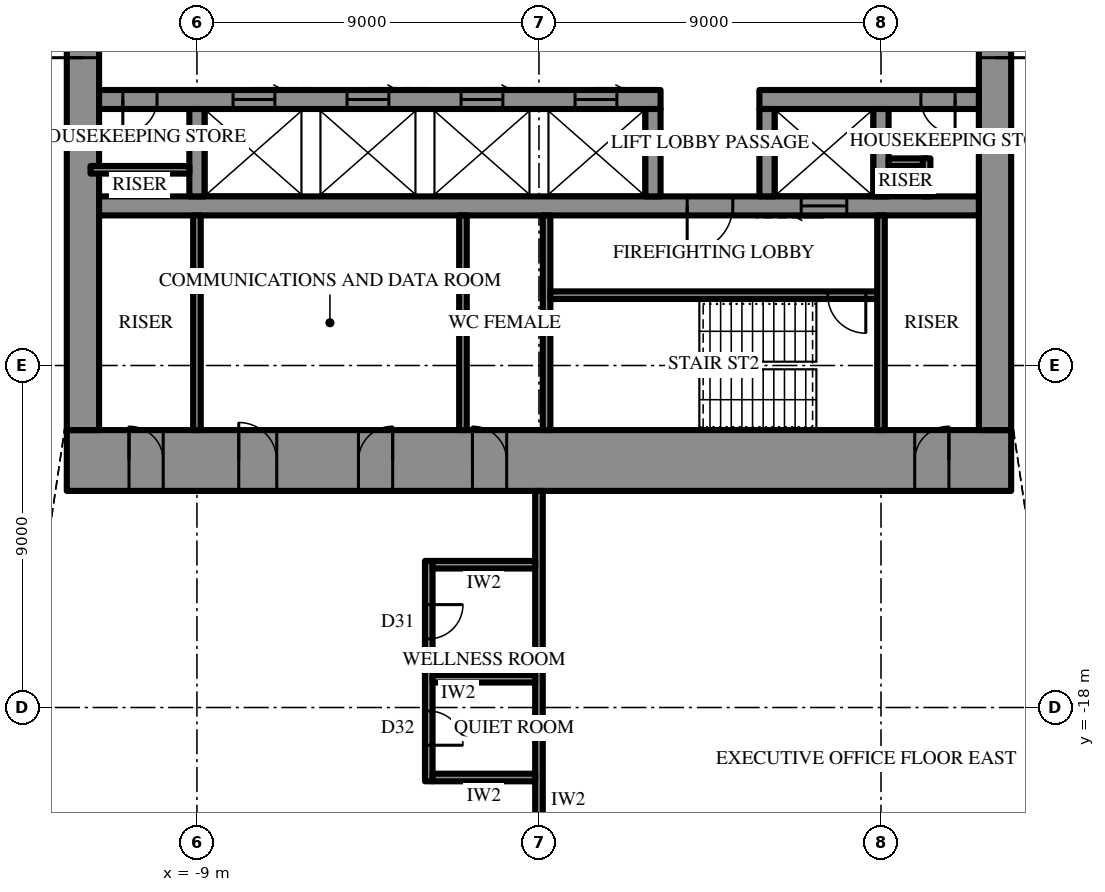
"""IFC4 building model, lengths in metres.
Left out: names, types, materials, properties, quantities, classifications, styles, units other than length and angle.
Written with IfcOpenShell. Run it as: python <this file> out.ifc"""

import sys

from ifc_helpers import new_model, si_unit, direction, frame, frame_2d, origin, place, context, subcontext, project, spatial, rectangle, extrude, element, fill, save


model = new_model("IFC4")
c1 = context("Model", 3, precision=1e-05, world=origin(), true_north=direction((0.0, 1.0)))
c2 = subcontext(c1, "Body", "Model", "MODEL_VIEW")
j1 = project(units=[si_unit("LENGTHUNIT", "METRE"), si_unit("PLANEANGLEUNIT", "RADIAN")], contexts=[c1])
p1 = place(None, origin())
s1 = spatial("IfcSite", under=j1, at=p1, CompositionType="ELEMENT")
p2 = place(p1, origin())
s2 = spatial("IfcBuilding", under=s1, at=p2, CompositionType="ELEMENT")
p3 = place(p2, frame((0.0, 0.0, 366.1)))
s3 = spatial("IfcBuildingStorey", under=s2, at=p3, CompositionType="ELEMENT", Elevation=366.1)
p4 = place(p3, frame((12.425, -11.5, 0.0), z_axis=(0.0, 0.0, 1.0), x_axis=(-1.0, 0.0, 0.0)))
e1 = element("IfcWall", 1, at=p4, inside=s3, PredefinedType="SHEAR", context=c2, shape_type="SweptSolid", body=[
    extrude(rectangle(XDim=24.85, YDim=1.6, at=frame_2d((12.425, 0.0))), origin(), (0.0, 0.0, 1.0), 4.2),
])
p5 = place(p4, frame((13.275, 0.0, 0.0)))
e2 = element("IfcOpeningElement", 2, at=p5, cuts=e1, PredefinedType="OPENING", context=c2, shape_type="SweptSolid", body=[
    extrude(rectangle(XDim=0.9, YDim=2.2, at=frame_2d((0.45, 1.1))), frame((0.0, 0.81, 0.0), z_axis=(0.0, -1.0, 0.0), x_axis=(1.0, 0.0, 0.0)), (0.0, 0.0, 1.0), 1.62),
])
p6 = place(p4, frame((16.275, 0.0, 0.0)))
e3 = element("IfcOpeningElement", 3, at=p6, cuts=e1, PredefinedType="OPENING", context=c2, shape_type="SweptSolid", body=[
    extrude(rectangle(XDim=0.9, YDim=2.2, at=frame_2d((0.45, 1.1))), frame((0.0, 0.81, 0.0), z_axis=(0.0, -1.0, 0.0), x_axis=(1.0, 0.0, 0.0)), (0.0, 0.0, 1.0), 1.62),
])
p7 = place(p4, frame((19.325, 0.0, 0.0)))
e4 = element("IfcOpeningElement", 4, at=p7, cuts=e1, PredefinedType="OPENING", context=c2, shape_type="SweptSolid", body=[
    extrude(rectangle(XDim=1.0, YDim=2.2, at=frame_2d((0.5, 1.1))), frame((0.0, 0.81, 0.0), z_axis=(0.0, -1.0, 0.0), x_axis=(1.0, 0.0, 0.0)), (0.0, 0.0, 1.0), 1.62),
])
p8 = place(p4, frame((1.637, 0.0, 0.0)))
e5 = element("IfcOpeningElement", 5, at=p8, cuts=e1, PredefinedType="OPENING", context=c2, shape_type="SweptSolid", body=[
    extrude(rectangle(XDim=0.9, YDim=2.2, at=frame_2d((0.45, 1.1))), frame((0.0, 0.81, 0.0), z_axis=(0.0, -1.0, 0.0), x_axis=(1.0, 0.0, 0.0)), (0.0, 0.0, 1.0), 1.62),
])
p9 = place(p4, frame((22.312, 0.0, 0.0)))
e6 = element("IfcOpeningElement", 6, at=p9, cuts=e1, PredefinedType="OPENING", context=c2, shape_type="SweptSolid", body=[
    extrude(rectangle(XDim=0.9, YDim=2.2, at=frame_2d((0.45, 1.1))), frame((0.0, 0.81, 0.0), z_axis=(0.0, -1.0, 0.0), x_axis=(1.0, 0.0, 0.0)), (0.0, 0.0, 1.0), 1.62),
])
p10 = place(p3, frame((12.0, -10.7, 0.0), z_axis=(0.0, 0.0, 1.0), x_axis=(0.0, 1.0, 0.0)))
e7 = element("IfcWall", 7, at=p10, inside=s3, PredefinedType="SHEAR", context=c2, shape_type="SweptSolid", body=[
    extrude(rectangle(XDim=21.4, YDim=0.85, at=frame_2d((10.7, 0.0))), origin(), (0.0, 0.0, 1.0), 4.2),
])
p11 = place(p10, frame((9.8, 0.0, 0.0)))
e8 = element("IfcOpeningElement", 8, at=p11, cuts=e7, PredefinedType="OPENING", context=c2, shape_type="SweptSolid", body=[
    extrude(rectangle(XDim=1.8, YDim=2.4, at=frame_2d((0.9, 1.2))), frame((0.0, 0.435, 0.0), z_axis=(0.0, -1.0, 0.0), x_axis=(1.0, 0.0, 0.0)), (0.0, 0.0, 1.0), 0.87),
])
p12 = place(p3, frame((-12.0, 10.7, 0.0), z_axis=(0.0, 0.0, 1.0), x_axis=(0.0, -1.0, 0.0)))
e9 = element("IfcWall", 9, at=p12, inside=s3, PredefinedType="SHEAR", context=c2, shape_type="SweptSolid", body=[
    extrude(rectangle(XDim=21.4, YDim=0.85, at=frame_2d((10.7, 0.0))), origin(), (0.0, 0.0, 1.0), 4.2),
])
p13 = place(p12, frame((9.8, 0.0, 0.0)))
e10 = element("IfcOpeningElement", 10, at=p13, cuts=e9, PredefinedType="OPENING", context=c2, shape_type="SweptSolid", body=[
    extrude(rectangle(XDim=1.8, YDim=2.4, at=frame_2d((0.9, 1.2))), frame((0.0, 0.435, 0.0), z_axis=(0.0, -1.0, 0.0), x_axis=(1.0, 0.0, 0.0)), (0.0, 0.0, 1.0), 0.87),
])
p14 = place(p3, frame((11.575, -2.0, 0.0), z_axis=(0.0, 0.0, 1.0), x_axis=(-1.0, 0.0, 0.0)))
e11 = element("IfcWall", 11, at=p14, inside=s3, PredefinedType="SHEAR", context=c2, shape_type="SweptSolid", body=[
    extrude(rectangle(XDim=5.775, YDim=0.5, at=frame_2d((2.887, 0.0))), origin(), (0.0, 0.0, 1.0), 4.2),
])
p15 = place(p14, frame((0.625, 0.0, 0.0)))
e12 = element("IfcOpeningElement", 12, at=p15, cuts=e11, PredefinedType="OPENING", context=c2, shape_type="SweptSolid", body=[
    extrude(rectangle(XDim=0.9, YDim=2.2, at=frame_2d((0.45, 1.1))), frame((0.0, 0.26, 0.0), z_axis=(0.0, -1.0, 0.0), x_axis=(1.0, 0.0, 0.0)), (0.0, 0.0, 1.0), 0.52),
])
p16 = place(p3, frame((3.2, -2.0, 0.0), z_axis=(0.0, 0.0, 1.0), x_axis=(-1.0, 0.0, 0.0)))
e13 = element("IfcWall", 13, at=p16, inside=s3, PredefinedType="SHEAR", context=c2, shape_type="SweptSolid", body=[
    extrude(rectangle(XDim=14.775, YDim=0.5, at=frame_2d((7.387, 0.0))), origin(), (0.0, 0.0, 1.0), 4.2),
])
p17 = place(p16, frame((13.25, 0.0, 0.0)))
e14 = element("IfcOpeningElement", 14, at=p17, cuts=e13, PredefinedType="OPENING", context=c2, shape_type="SweptSolid", body=[
    extrude(rectangle(XDim=0.9, YDim=2.2, at=frame_2d((0.45, 1.1))), frame((0.0, 0.26, 0.0), z_axis=(0.0, -1.0, 0.0), x_axis=(1.0, 0.0, 0.0)), (0.0, 0.0, 1.0), 0.52),
])
p18 = place(p16, frame((1.15, 0.0, 0.0)))
e15 = element("IfcOpeningElement", 15, at=p18, cuts=e13, PredefinedType="OPENING", context=c2, shape_type="SweptSolid", body=[
    extrude(rectangle(XDim=1.1, YDim=2.2, at=frame_2d((0.55, 1.1))), frame((0.0, 0.26, 0.0), z_axis=(0.0, -1.0, 0.0), x_axis=(1.0, 0.0, 0.0)), (0.0, 0.0, 1.0), 0.52),
])
p19 = place(p16, frame((4.15, 0.0, 0.0)))
e16 = element("IfcOpeningElement", 16, at=p19, cuts=e13, PredefinedType="OPENING", context=c2, shape_type="SweptSolid", body=[
    extrude(rectangle(XDim=1.1, YDim=2.2, at=frame_2d((0.55, 1.1))), frame((0.0, 0.26, 0.0), z_axis=(0.0, -1.0, 0.0), x_axis=(1.0, 0.0, 0.0)), (0.0, 0.0, 1.0), 0.52),
])
p20 = place(p16, frame((7.15, 0.0, 0.0)))
e17 = element("IfcOpeningElement", 17, at=p20, cuts=e13, PredefinedType="OPENING", context=c2, shape_type="SweptSolid", body=[
    extrude(rectangle(XDim=1.1, YDim=2.2, at=frame_2d((0.55, 1.1))), frame((0.0, 0.26, 0.0), z_axis=(0.0, -1.0, 0.0), x_axis=(1.0, 0.0, 0.0)), (0.0, 0.0, 1.0), 0.52),
])
p21 = place(p16, frame((10.15, 0.0, 0.0)))
e18 = element("IfcOpeningElement", 18, at=p21, cuts=e13, PredefinedType="OPENING", context=c2, shape_type="SweptSolid", body=[
    extrude(rectangle(XDim=1.1, YDim=2.2, at=frame_2d((0.55, 1.1))), frame((0.0, 0.26, 0.0), z_axis=(0.0, -1.0, 0.0), x_axis=(1.0, 0.0, 0.0)), (0.0, 0.0, 1.0), 0.52),
])
p22 = place(p3, frame((11.575, -4.8, 0.0), z_axis=(0.0, 0.0, 1.0), x_axis=(-1.0, 0.0, 0.0)))
e19 = element("IfcWall", 19, at=p22, inside=s3, PredefinedType="SHEAR", context=c2, shape_type="SweptSolid", body=[
    extrude(rectangle(XDim=23.15, YDim=0.5, at=frame_2d((11.575, 0.0))), origin(), (0.0, 0.0, 1.0), 4.2),
])
p23 = place(p22, frame((6.475, 0.0, 0.0)))
e20 = element("IfcOpeningElement", 20, at=p23, cuts=e19, PredefinedType="OPENING", context=c2, shape_type="SweptSolid", body=[
    extrude(rectangle(XDim=1.2, YDim=2.2, at=frame_2d((0.6, 1.1))), frame((0.0, 0.26, 0.0), z_axis=(0.0, -1.0, 0.0), x_axis=(1.0, 0.0, 0.0)), (0.0, 0.0, 1.0), 0.52),
])
p24 = place(p22, frame((3.475, 0.0, 0.0)))
e21 = element("IfcOpeningElement", 21, at=p24, cuts=e19, PredefinedType="OPENING", context=c2, shape_type="SweptSolid", body=[
    extrude(rectangle(XDim=1.2, YDim=2.2, at=frame_2d((0.6, 1.1))), frame((0.0, 0.26, 0.0), z_axis=(0.0, -1.0, 0.0), x_axis=(1.0, 0.0, 0.0)), (0.0, 0.0, 1.0), 0.52),
])
for number, where, z_axis, x_axis in (
    (22, (9.0, -2.25, 0.0), (0.0, 0.0, 1.0), (0.0, -1.0, 0.0)),
    (23, (6.0, -2.25, 0.0), (0.0, 0.0, 1.0), (0.0, -1.0, 0.0)),
    (24, (3.0, -2.25, 0.0), (0.0, 0.0, 1.0), (0.0, -1.0, 0.0)),
    (25, (-9.0, -2.25, 0.0), (0.0, 0.0, 1.0), (0.0, -1.0, 0.0)),
):
    element("IfcWall", number, at=place(p3, frame(where, z_axis=z_axis, x_axis=x_axis)), inside=s3, PredefinedType="SHEAR", context=c2, shape_type="SweptSolid", body=[
        extrude(rectangle(XDim=2.3, YDim=0.4, at=frame_2d((1.15, 0.0))), origin(), (0.0, 0.0, 1.0), 4.2),
    ])
p25 = place(p3, frame((0.2, -5.05, 0.0), z_axis=(0.0, 0.0, 1.0), x_axis=(0.0, -1.0, 0.0)))
e26 = element("IfcWall", 26, at=p25, inside=s3, PredefinedType="SHEAR", context=c2, shape_type="SweptSolid", body=[
    extrude(rectangle(XDim=5.65, YDim=0.2, at=frame_2d((2.825, 0.0))), origin(), (0.0, 0.0, 1.0), 4.2),
])
p26 = place(p3, frame((8.9, -7.15, 0.0), z_axis=(0.0, 0.0, 1.0), x_axis=(-1.0, 0.0, 0.0)))
e27 = element("IfcWall", 27, at=p26, inside=s3, PredefinedType="SHEAR", context=c2, shape_type="SweptSolid", body=[
    extrude(rectangle(XDim=8.6, YDim=0.2, at=frame_2d((4.3, 0.0))), origin(), (0.0, 0.0, 1.0), 4.2),
])
p27 = place(p26, frame((0.3, 0.0, 0.0)))
e28 = element("IfcOpeningElement", 28, at=p27, cuts=e27, PredefinedType="OPENING", context=c2, shape_type="SweptSolid", body=[
    extrude(rectangle(XDim=1.0, YDim=2.2, at=frame_2d((0.5, 1.1))), frame((0.0, 0.11, 0.0), z_axis=(0.0, -1.0, 0.0), x_axis=(1.0, 0.0, 0.0)), (0.0, 0.0, 1.0), 0.22),
])
for number, where, z_axis, x_axis in (
    (29, (9.0, -5.05, 0.0), (0.0, 0.0, 1.0), (0.0, -1.0, 0.0)),
    (30, (-9.0, -5.05, 0.0), (0.0, 0.0, 1.0), (0.0, -1.0, 0.0)),
    (31, (-2.0, -5.05, 0.0), (0.0, 0.0, 1.0), (0.0, -1.0, 0.0)),
):
    element("IfcWall", number, at=place(p3, frame(where, z_axis=z_axis, x_axis=x_axis)), inside=s3, PredefinedType="PARTITIONING", context=c2, shape_type="SweptSolid", body=[
        extrude(rectangle(XDim=5.65, YDim=0.2, at=frame_2d((2.825, 0.0))), origin(), (0.0, 0.0, 1.0), 4.0),
    ])
for number, where, z_axis, x_axis in (
    (32, (10.2, -3.65, 0.0), (0.0, 0.0, 1.0), (-1.0, 0.0, 0.0)),
    (33, (10.2, -3.55, 0.0), (0.0, 0.0, 1.0), (0.0, -1.0, 0.0)),
):
    element("IfcWall", number, at=place(p3, frame(where, z_axis=z_axis, x_axis=x_axis)), inside=s3, PredefinedType="PARTITIONING", context=c2, shape_type="SweptSolid", body=[
        extrude(rectangle(XDim=1.0, YDim=0.2, at=frame_2d((0.5, 0.0))), origin(), (0.0, 0.0, 1.0), 4.0),
    ])
p28 = place(p3, frame((-9.2, -3.85, 0.0), z_axis=(0.0, 0.0, 1.0), x_axis=(-1.0, 0.0, 0.0)))
e34 = element("IfcWall", 34, at=p28, inside=s3, PredefinedType="PARTITIONING", context=c2, shape_type="SweptSolid", body=[
    extrude(rectangle(XDim=2.6, YDim=0.2, at=frame_2d((1.3, 0.0))), origin(), (0.0, 0.0, 1.0), 4.0),
])
p29 = place(p3, frame((0.0, -12.3, 0.0), z_axis=(0.0, 0.0, 1.0), x_axis=(0.0, -1.0, 0.0)))
e35 = element("IfcWall", 35, at=p29, inside=s3, PredefinedType="PARTITIONING", context=c2, shape_type="SweptSolid", body=[
    extrude(rectangle(XDim=13.55, YDim=0.2, at=frame_2d((6.775, 0.0))), origin(), (0.0, 0.0, 1.0), 2.992),
])
p30 = place(p3, frame((-2.9, -14.143, 0.0), z_axis=(0.0, 0.0, 1.0), x_axis=(0.0, -1.0, 0.0)))
e36 = element("IfcWall", 36, at=p30, inside=s3, PredefinedType="PARTITIONING", context=c2, shape_type="SweptSolid", body=[
    extrude(rectangle(XDim=5.8, YDim=0.2, at=frame_2d((2.9, 0.0))), origin(), (0.0, 0.0, 1.0), 4.0),
])
p31 = place(p30, frame((1.15, 0.0, 0.0)))
e37 = element("IfcOpeningElement", 37, at=p31, cuts=e36, PredefinedType="OPENING", context=c2, shape_type="SweptSolid", body=[
    extrude(rectangle(XDim=0.9, YDim=2.2, at=frame_2d((0.45, 1.1))), frame((0.0, 0.11, 0.0), z_axis=(0.0, -1.0, 0.0), x_axis=(1.0, 0.0, 0.0)), (0.0, 0.0, 1.0), 0.22),
])
p32 = place(p30, frame((3.95, 0.0, 0.0)))
e38 = element("IfcOpeningElement", 38, at=p32, cuts=e36, PredefinedType="OPENING", context=c2, shape_type="SweptSolid", body=[
    extrude(rectangle(XDim=0.9, YDim=2.2, at=frame_2d((0.45, 1.1))), frame((0.0, 0.11, 0.0), z_axis=(0.0, -1.0, 0.0), x_axis=(1.0, 0.0, 0.0)), (0.0, 0.0, 1.0), 0.22),
])
for number, where, z_axis, x_axis in (
    (39, (-0.1, -14.242, 0.0), (0.0, 0.0, 1.0), (-1.0, 0.0, 0.0)),
    (40, (-0.1, -17.242, 0.0), (0.0, 0.0, 1.0), (-1.0, 0.0, 0.0)),
    (41, (-0.1, -19.843, 0.0), (0.0, 0.0, 1.0), (-1.0, 0.0, 0.0)),
):
    element("IfcWall", number, at=place(p3, frame(where, z_axis=z_axis, x_axis=x_axis)), inside=s3, PredefinedType="PARTITIONING", context=c2, shape_type="SweptSolid", body=[
        extrude(rectangle(XDim=2.7, YDim=0.2, at=frame_2d((1.35, 0.0))), origin(), (0.0, 0.0, 1.0), 4.0),
    ])
p33 = place(p11, frame((1.8, 0.0, 0.0), z_axis=(0.0, 0.0, 1.0), x_axis=(-1.0, 0.0, 0.0)))
e42 = element("IfcDoor", 42, at=p33, inside=s3, OperationType="DOUBLE_DOOR_SINGLE_SWING", PredefinedType="DOOR", context=c2, shape_type="SweptSolid", body=[
    extrude(rectangle(XDim=1.8, YDim=2.4, at=frame_2d((0.9, 1.2))), frame((0.0, 0.025, 0.0), z_axis=(0.0, -1.0, 0.0), x_axis=(1.0, 0.0, 0.0)), (0.0, 0.0, 1.0), 0.05),
])
fill(e8, e42)
p34 = place(p13, frame((1.8, 0.0, 0.0), z_axis=(0.0, 0.0, 1.0), x_axis=(-1.0, 0.0, 0.0)))
e43 = element("IfcDoor", 43, at=p34, inside=s3, OperationType="DOUBLE_DOOR_SINGLE_SWING", PredefinedType="DOOR", context=c2, shape_type="SweptSolid", body=[
    extrude(rectangle(XDim=1.8, YDim=2.4, at=frame_2d((0.9, 1.2))), frame((0.0, 0.025, 0.0), z_axis=(0.0, -1.0, 0.0), x_axis=(1.0, 0.0, 0.0)), (0.0, 0.0, 1.0), 0.05),
])
fill(e10, e43)
p35 = place(p23, origin())
e44 = element("IfcDoor", 44, at=p35, inside=s3, OperationType="SINGLE_SWING_LEFT", PredefinedType="DOOR", context=c2, shape_type="SweptSolid", body=[
    extrude(rectangle(XDim=1.2, YDim=2.2, at=frame_2d((0.6, 1.1))), frame((0.0, 0.025, 0.0), z_axis=(0.0, -1.0, 0.0), x_axis=(1.0, 0.0, 0.0)), (0.0, 0.0, 1.0), 0.05),
])
fill(e20, e44)
p36 = place(p27, origin())
e45 = element("IfcDoor", 45, at=p36, inside=s3, OperationType="SINGLE_SWING_RIGHT", PredefinedType="DOOR", context=c2, shape_type="SweptSolid", body=[
    extrude(rectangle(XDim=1.0, YDim=2.2, at=frame_2d((0.5, 1.1))), frame((0.0, 0.025, 0.0), z_axis=(0.0, -1.0, 0.0), x_axis=(1.0, 0.0, 0.0)), (0.0, 0.0, 1.0), 0.05),
])
fill(e28, e45)
p37 = place(p5, frame((0.9, 0.0, 0.0), z_axis=(0.0, 0.0, 1.0), x_axis=(-1.0, 0.0, 0.0)))
e46 = element("IfcDoor", 46, at=p37, inside=s3, OperationType="SINGLE_SWING_RIGHT", PredefinedType="DOOR", context=c2, shape_type="SweptSolid", body=[
    extrude(rectangle(XDim=0.9, YDim=2.2, at=frame_2d((0.45, 1.1))), frame((0.0, 0.025, 0.0), z_axis=(0.0, -1.0, 0.0), x_axis=(1.0, 0.0, 0.0)), (0.0, 0.0, 1.0), 0.05),
])
fill(e2, e46)
p38 = place(p6, frame((0.9, 0.0, 0.0), z_axis=(0.0, 0.0, 1.0), x_axis=(-1.0, 0.0, 0.0)))
e47 = element("IfcDoor", 47, at=p38, inside=s3, OperationType="SINGLE_SWING_LEFT", PredefinedType="DOOR", context=c2, shape_type="SweptSolid", body=[
    extrude(rectangle(XDim=0.9, YDim=2.2, at=frame_2d((0.45, 1.1))), frame((0.0, 0.025, 0.0), z_axis=(0.0, -1.0, 0.0), x_axis=(1.0, 0.0, 0.0)), (0.0, 0.0, 1.0), 0.05),
])
fill(e3, e47)
p39 = place(p7, frame((1.0, 0.0, 0.0), z_axis=(0.0, 0.0, 1.0), x_axis=(-1.0, 0.0, 0.0)))
e48 = element("IfcDoor", 48, at=p39, inside=s3, OperationType="SINGLE_SWING_RIGHT", PredefinedType="DOOR", context=c2, shape_type="SweptSolid", body=[
    extrude(rectangle(XDim=1.0, YDim=2.2, at=frame_2d((0.5, 1.1))), frame((0.0, 0.025, 0.0), z_axis=(0.0, -1.0, 0.0), x_axis=(1.0, 0.0, 0.0)), (0.0, 0.0, 1.0), 0.05),
])
fill(e4, e48)
p40 = place(p8, frame((0.9, 0.0, 0.0), z_axis=(0.0, 0.0, 1.0), x_axis=(-1.0, 0.0, 0.0)))
e49 = element("IfcDoor", 49, at=p40, inside=s3, OperationType="SINGLE_SWING_LEFT", PredefinedType="DOOR", context=c2, shape_type="SweptSolid", body=[
    extrude(rectangle(XDim=0.9, YDim=2.2, at=frame_2d((0.45, 1.1))), frame((0.0, 0.025, 0.0), z_axis=(0.0, -1.0, 0.0), x_axis=(1.0, 0.0, 0.0)), (0.0, 0.0, 1.0), 0.05),
])
fill(e5, e49)
p41 = place(p9, frame((0.9, 0.0, 0.0), z_axis=(0.0, 0.0, 1.0), x_axis=(-1.0, 0.0, 0.0)))
e50 = element("IfcDoor", 50, at=p41, inside=s3, OperationType="SINGLE_SWING_RIGHT", PredefinedType="DOOR", context=c2, shape_type="SweptSolid", body=[
    extrude(rectangle(XDim=0.9, YDim=2.2, at=frame_2d((0.45, 1.1))), frame((0.0, 0.025, 0.0), z_axis=(0.0, -1.0, 0.0), x_axis=(1.0, 0.0, 0.0)), (0.0, 0.0, 1.0), 0.05),
])
fill(e6, e50)
p42 = place(p15, origin())
e51 = element("IfcDoor", 51, at=p42, inside=s3, OperationType="SINGLE_SWING_RIGHT", PredefinedType="DOOR", context=c2, shape_type="SweptSolid", body=[
    extrude(rectangle(XDim=0.9, YDim=2.2, at=frame_2d((0.45, 1.1))), frame((0.0, 0.025, 0.0), z_axis=(0.0, -1.0, 0.0), x_axis=(1.0, 0.0, 0.0)), (0.0, 0.0, 1.0), 0.05),
])
fill(e12, e51)
p43 = place(p17, origin())
e52 = element("IfcDoor", 52, at=p43, inside=s3, OperationType="SINGLE_SWING_LEFT", PredefinedType="DOOR", context=c2, shape_type="SweptSolid", body=[
    extrude(rectangle(XDim=0.9, YDim=2.2, at=frame_2d((0.45, 1.1))), frame((0.0, 0.025, 0.0), z_axis=(0.0, -1.0, 0.0), x_axis=(1.0, 0.0, 0.0)), (0.0, 0.0, 1.0), 0.05),
])
fill(e14, e52)
p44 = place(p24, origin())
e53 = element("IfcDoor", 53, at=p44, inside=s3, OperationType="SLIDING_TO_LEFT", PredefinedType="DOOR", context=c2, shape_type="SweptSolid", body=[
    extrude(rectangle(XDim=1.2, YDim=2.2, at=frame_2d((0.6, 1.1))), frame((0.0, 0.025, 0.0), z_axis=(0.0, -1.0, 0.0), x_axis=(1.0, 0.0, 0.0)), (0.0, 0.0, 1.0), 0.05),
])
fill(e21, e53)
p45 = place(p18, frame((1.1, 0.0, 0.0), z_axis=(0.0, 0.0, 1.0), x_axis=(-1.0, 0.0, 0.0)))
e54 = element("IfcDoor", 54, at=p45, inside=s3, OperationType="SLIDING_TO_LEFT", PredefinedType="DOOR", context=c2, shape_type="SweptSolid", body=[
    extrude(rectangle(XDim=1.1, YDim=2.2, at=frame_2d((0.55, 1.1))), frame((0.0, 0.025, 0.0), z_axis=(0.0, -1.0, 0.0), x_axis=(1.0, 0.0, 0.0)), (0.0, 0.0, 1.0), 0.05),
])
fill(e15, e54)
p46 = place(p19, frame((1.1, 0.0, 0.0), z_axis=(0.0, 0.0, 1.0), x_axis=(-1.0, 0.0, 0.0)))
e55 = element("IfcDoor", 55, at=p46, inside=s3, OperationType="SLIDING_TO_LEFT", PredefinedType="DOOR", context=c2, shape_type="SweptSolid", body=[
    extrude(rectangle(XDim=1.1, YDim=2.2, at=frame_2d((0.55, 1.1))), frame((0.0, 0.025, 0.0), z_axis=(0.0, -1.0, 0.0), x_axis=(1.0, 0.0, 0.0)), (0.0, 0.0, 1.0), 0.05),
])
fill(e16, e55)
p47 = place(p20, frame((1.1, 0.0, 0.0), z_axis=(0.0, 0.0, 1.0), x_axis=(-1.0, 0.0, 0.0)))
e56 = element("IfcDoor", 56, at=p47, inside=s3, OperationType="SLIDING_TO_LEFT", PredefinedType="DOOR", context=c2, shape_type="SweptSolid", body=[
    extrude(rectangle(XDim=1.1, YDim=2.2, at=frame_2d((0.55, 1.1))), frame((0.0, 0.025, 0.0), z_axis=(0.0, -1.0, 0.0), x_axis=(1.0, 0.0, 0.0)), (0.0, 0.0, 1.0), 0.05),
])
fill(e17, e56)
p48 = place(p21, frame((1.1, 0.0, 0.0), z_axis=(0.0, 0.0, 1.0), x_axis=(-1.0, 0.0, 0.0)))
e57 = element("IfcDoor", 57, at=p48, inside=s3, OperationType="SLIDING_TO_LEFT", PredefinedType="DOOR", context=c2, shape_type="SweptSolid", body=[
    extrude(rectangle(XDim=1.1, YDim=2.2, at=frame_2d((0.55, 1.1))), frame((0.0, 0.025, 0.0), z_axis=(0.0, -1.0, 0.0), x_axis=(1.0, 0.0, 0.0)), (0.0, 0.0, 1.0), 0.05),
])
fill(e18, e57)
p49 = place(p31, origin())
e58 = element("IfcDoor", 58, at=p49, inside=s3, OperationType="SINGLE_SWING_RIGHT", PredefinedType="DOOR", context=c2, shape_type="SweptSolid", body=[
    extrude(rectangle(XDim=0.9, YDim=2.2, at=frame_2d((0.45, 1.1))), frame((0.0, 0.025, 0.0), z_axis=(0.0, -1.0, 0.0), x_axis=(1.0, 0.0, 0.0)), (0.0, 0.0, 1.0), 0.05),
])
fill(e37, e58)
p50 = place(p32, origin())
e59 = element("IfcDoor", 59, at=p50, inside=s3, OperationType="SINGLE_SWING_LEFT", PredefinedType="DOOR", context=c2, shape_type="SweptSolid", body=[
    extrude(rectangle(XDim=0.9, YDim=2.2, at=frame_2d((0.45, 1.1))), frame((0.0, 0.025, 0.0), z_axis=(0.0, -1.0, 0.0), x_axis=(1.0, 0.0, 0.0)), (0.0, 0.0, 1.0), 0.05),
])
fill(e38, e59)
save(model, sys.argv[1])
